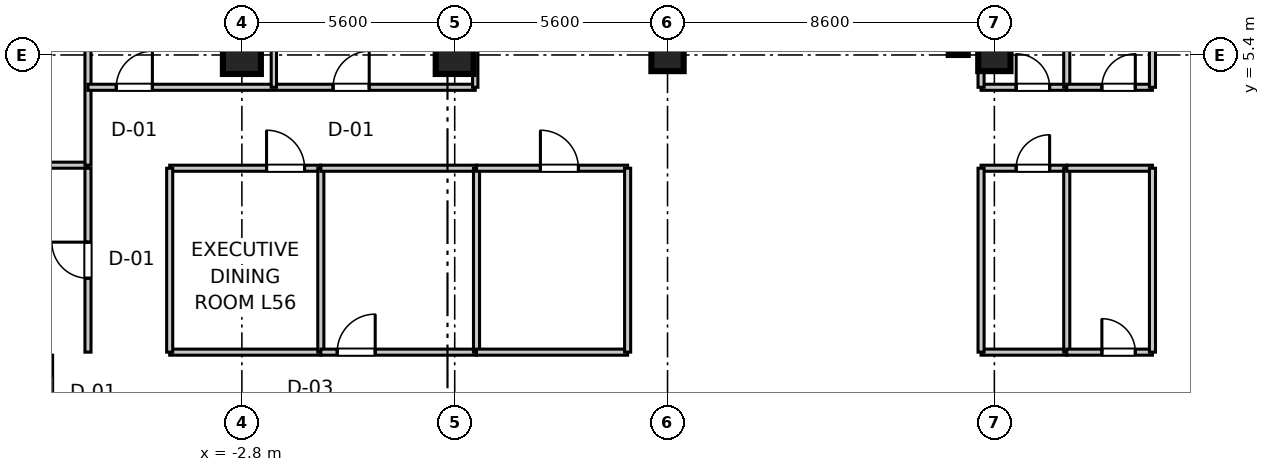
"""IFC4 building model, lengths in metres.
Left out: names, types, materials, properties, quantities, classifications, styles, units other than length and angle.
Written with IfcOpenShell. Run it as: python <this file> out.ifc"""

import sys

from ifc_helpers import new_model, si_unit, direction, frame, frame_2d, origin, origin_2d, place, context, subcontext, project, spatial, rectangle, extrude, source, transform, mapped, element, fill, save


model = new_model("IFC4")
c1 = context("Model", 3, precision=1e-05, world=origin(), true_north=direction((0.0, 1.0)))
c2 = subcontext(c1, "Body", "Model", "MODEL_VIEW")
j1 = project(units=[si_unit("LENGTHUNIT", "METRE"), si_unit("PLANEANGLEUNIT", "RADIAN")], contexts=[c1])
p1 = place(None, origin())
s1 = spatial("IfcSite", under=j1, at=p1, CompositionType="ELEMENT")
p2 = place(p1, origin())
s2 = spatial("IfcBuilding", under=s1, at=p2, CompositionType="ELEMENT")
p3 = place(p2, frame((0.0, 0.0, 219.7)))
s3 = spatial("IfcBuildingStorey", under=s2, at=p3, CompositionType="ELEMENT", Elevation=219.7)
m1 = source(origin(), c2, "Body", "SweptSolid", [
    extrude(rectangle(XDim=1.0, YDim=1.0, at=origin_2d()), origin(), (0.0, 0.0, 1.0), 3.655),
])
for number, where, z_axis, x_axis in (
    (1, (-2.8, 5.4, 0.0), (0.0, 0.0, 1.0), (1.0, 0.0, 0.0)),
    (2, (2.8, 5.4, 0.0), (0.0, 0.0, 1.0), (1.0, 0.0, 0.0)),
):
    element("IfcColumn", number, at=place(p3, frame(where, z_axis=z_axis, x_axis=x_axis)), inside=s3, PredefinedType="COLUMN", context=c2, shape_type="MappedRepresentation", body=[
        mapped(m1, transform((0.0, 0.0, 0.0), scale=1.0)),
    ])
m2 = source(origin(), c2, "Body", "SweptSolid", [
    extrude(rectangle(XDim=0.85, YDim=0.85, at=origin_2d()), origin(), (0.0, 0.0, 1.0), 3.655),
])
for number, where, z_axis, x_axis in (
    (3, (8.4, 5.4, 0.0), (0.0, 0.0, 1.0), (1.0, 0.0, 0.0)),
    (4, (17.0, 5.4, 0.0), (0.0, 0.0, 1.0), (1.0, 0.0, 0.0)),
):
    element("IfcColumn", number, at=place(p3, frame(where, z_axis=z_axis, x_axis=x_axis)), inside=s3, PredefinedType="PILASTER", context=c2, shape_type="MappedRepresentation", body=[
        mapped(m2, transform((0.0, 0.0, 0.0), scale=1.0)),
    ])
m3 = source(origin(), c2, "Body", "SweptSolid", [
    extrude(rectangle(XDim=11.6, YDim=0.5, at=frame_2d((5.8, 0.0))), origin(), (0.0, 0.0, 1.0), 3.41),
])
p4 = place(p3, frame((16.05, 5.4, 0.0), z_axis=(0.0, 0.0, 1.0), x_axis=(0.0, 1.0, 0.0)))
e5 = element("IfcWall", 5, at=p4, inside=s3, PredefinedType="SHEAR", context=c2, shape_type="MappedRepresentation", body=[
    mapped(m3, transform((0.0, 0.0, 0.0), scale=1.0)),
])
m4 = source(origin(), c2, "Body", "SweptSolid", [
    extrude(rectangle(XDim=2.255, YDim=0.16, at=frame_2d((1.127, 0.0))), origin(), (0.0, 0.0, 1.0), 2.75),
])
p5 = place(p3, frame((16.65, 4.55, 0.0), z_axis=(0.0, 0.0, 1.0), x_axis=(1.0, 0.0, 0.0)))
e6 = element("IfcWall", 6, at=p5, inside=s3, PredefinedType="PARTITIONING", context=c2, shape_type="MappedRepresentation", body=[
    mapped(m4, transform((0.0, 0.0, 0.0), scale=1.0)),
])
p6 = place(p5, frame((0.924, 0.0, 0.0)))
e7 = element("IfcOpeningElement", 7, at=p6, cuts=e6, PredefinedType="OPENING", context=c2, shape_type="SweptSolid", body=[
    extrude(rectangle(XDim=0.88, YDim=2.1, at=frame_2d((0.44, 1.05))), frame((0.0, 0.09, 0.0), z_axis=(0.0, -1.0, 0.0), x_axis=(1.0, 0.0, 0.0)), (0.0, 0.0, 1.0), 0.18),
])
m5 = source(origin(), c2, "Body", "SweptSolid", [
    extrude(rectangle(XDim=19.35, YDim=0.16, at=frame_2d((9.675, 0.0))), origin(), (0.0, 0.0, 1.0), 2.75),
])
for number, where, z_axis, x_axis in (
    (8, (16.65, 4.55, 0.0), (0.0, 0.0, 1.0), (0.0, 1.0, 0.0)),
    (9, (18.905, 4.55, 0.0), (0.0, 0.0, 1.0), (0.0, 1.0, 0.0)),
):
    element("IfcWall", number, at=place(p3, frame(where, z_axis=z_axis, x_axis=x_axis)), inside=s3, PredefinedType="PARTITIONING", context=c2, shape_type="MappedRepresentation", body=[
        mapped(m5, transform((0.0, 0.0, 0.0), scale=1.0)),
    ])
m6 = source(origin(), c2, "Body", "SweptSolid", [
    extrude(rectangle(XDim=2.255, YDim=0.16, at=frame_2d((1.127, 0.0))), origin(), (0.0, 0.0, 1.0), 2.75),
])
p7 = place(p3, frame((18.905, 4.55, 0.0), z_axis=(0.0, 0.0, 1.0), x_axis=(1.0, 0.0, 0.0)))
e10 = element("IfcWall", 10, at=p7, inside=s3, PredefinedType="PARTITIONING", context=c2, shape_type="MappedRepresentation", body=[
    mapped(m6, transform((0.0, 0.0, 0.0), scale=1.0)),
])
p8 = place(p7, frame((0.924, 0.0, 0.0)))
e11 = element("IfcOpeningElement", 11, at=p8, cuts=e10, PredefinedType="OPENING", context=c2, shape_type="SweptSolid", body=[
    extrude(rectangle(XDim=0.88, YDim=2.1, at=frame_2d((0.44, 1.05))), frame((0.0, 0.09, 0.0), z_axis=(0.0, -1.0, 0.0), x_axis=(1.0, 0.0, 0.0)), (0.0, 0.0, 1.0), 0.18),
])
m7 = source(origin(), c2, "Body", "SweptSolid", [
    extrude(rectangle(XDim=17.93, YDim=0.16, at=frame_2d((8.965, 0.0))), origin(), (0.0, 0.0, 1.0), 2.75),
])
p9 = place(p3, frame((21.16, 4.55, 0.0), z_axis=(0.0, 0.0, 1.0), x_axis=(0.0, 1.0, 0.0)))
e12 = element("IfcWall", 12, at=p9, inside=s3, PredefinedType="PARTITIONING", context=c2, shape_type="MappedRepresentation", body=[
    mapped(m7, transform((0.0, 0.0, 0.0), scale=1.0)),
])
m8 = source(origin(), c2, "Body", "SweptSolid", [
    extrude(rectangle(XDim=14.31, YDim=0.16, at=frame_2d((7.155, 0.0))), origin(), (0.0, 0.0, 1.0), 2.75),
])
p10 = place(p3, frame((-21.16, 2.5, 0.0), z_axis=(0.0, 0.0, 1.0), x_axis=(1.0, 0.0, 0.0)))
e13 = element("IfcWall", 13, at=p10, inside=s3, PredefinedType="PARTITIONING", context=c2, shape_type="MappedRepresentation", body=[
    mapped(m8, transform((0.0, 0.0, 0.0), scale=1.0)),
])
m9 = source(origin(), c2, "Body", "SweptSolid", [
    extrude(rectangle(XDim=10.7, YDim=0.16, at=frame_2d((5.35, 0.0))), origin(), (0.0, 0.0, 1.0), 2.75),
])
p11 = place(p3, frame((-6.85, 2.5, 0.0), z_axis=(0.0, 0.0, 1.0), x_axis=(0.0, 1.0, 0.0)))
e14 = element("IfcWall", 14, at=p11, inside=s3, PredefinedType="PARTITIONING", context=c2, shape_type="MappedRepresentation", body=[
    mapped(m9, transform((0.0, 0.0, 0.0), scale=1.0)),
])
p12 = place(p11, frame((4.91, 0.0, 0.0)))
e15 = element("IfcOpeningElement", 15, at=p12, cuts=e14, PredefinedType="OPENING", context=c2, shape_type="SweptSolid", body=[
    extrude(rectangle(XDim=0.88, YDim=2.1, at=frame_2d((0.44, 1.05))), frame((0.0, 0.09, 0.0), z_axis=(0.0, -1.0, 0.0), x_axis=(1.0, 0.0, 0.0)), (0.0, 0.0, 1.0), 0.18),
])
m10 = source(origin(), c2, "Body", "SweptSolid", [
    extrude(rectangle(XDim=10.19, YDim=0.16, at=frame_2d((5.095, 0.0))), origin(), (0.0, 0.0, 1.0), 2.75),
])
p13 = place(p3, frame((-6.85, 4.55, 0.0), z_axis=(0.0, 0.0, 1.0), x_axis=(1.0, 0.0, 0.0)))
e16 = element("IfcWall", 16, at=p13, inside=s3, PredefinedType="PARTITIONING", context=c2, shape_type="MappedRepresentation", body=[
    mapped(m10, transform((0.0, 0.0, 0.0), scale=1.0)),
])
p14 = place(p13, frame((0.745, 0.0, 0.0)))
e17 = element("IfcOpeningElement", 17, at=p14, cuts=e16, PredefinedType="OPENING", context=c2, shape_type="SweptSolid", body=[
    extrude(rectangle(XDim=0.95, YDim=2.1, at=frame_2d((0.475, 1.05))), frame((0.0, 0.09, 0.0), z_axis=(0.0, -1.0, 0.0), x_axis=(1.0, 0.0, 0.0)), (0.0, 0.0, 1.0), 0.18),
])
p15 = place(p13, frame((6.45, 0.0, 0.0)))
e18 = element("IfcOpeningElement", 18, at=p15, cuts=e16, PredefinedType="OPENING", context=c2, shape_type="SweptSolid", body=[
    extrude(rectangle(XDim=0.95, YDim=2.1, at=frame_2d((0.475, 1.05))), frame((0.0, 0.09, 0.0), z_axis=(0.0, -1.0, 0.0), x_axis=(1.0, 0.0, 0.0)), (0.0, 0.0, 1.0), 0.18),
])
m11 = source(origin(), c2, "Body", "SweptSolid", [
    extrude(rectangle(XDim=19.35, YDim=0.14, at=frame_2d((9.675, 0.0))), origin(), (0.0, 0.0, 1.0), 2.75),
])
for number, where, z_axis, x_axis in (
    (19, (3.34, 4.55, 0.0), (0.0, 0.0, 1.0), (0.0, 1.0, 0.0)),
    (20, (-1.959, 4.55, 0.0), (0.0, 0.0, 1.0), (0.0, 1.0, 0.0)),
):
    element("IfcWall", number, at=place(p3, frame(where, z_axis=z_axis, x_axis=x_axis)), inside=s3, PredefinedType="PARTITIONING", context=c2, shape_type="MappedRepresentation", body=[
        mapped(m11, transform((0.0, 0.0, 0.0), scale=1.0)),
    ])
m12 = source(origin(), c2, "Body", "SweptSolid", [
    extrude(rectangle(XDim=21.4, YDim=0.16, at=frame_2d((10.7, 0.0))), origin(), (0.0, 0.0, 1.0), 2.75),
])
p16 = place(p3, frame((-7.86, -23.9, 0.0), z_axis=(0.0, 0.0, 1.0), x_axis=(0.0, 1.0, 0.0)))
e21 = element("IfcWall", 21, at=p16, inside=s3, PredefinedType="PARTITIONING", context=c2, shape_type="MappedRepresentation", body=[
    mapped(m12, transform((0.0, 0.0, 0.0), scale=1.0)),
])
p17 = place(p16, frame((19.925, 0.0, 0.0)))
e22 = element("IfcOpeningElement", 22, at=p17, cuts=e21, PredefinedType="OPENING", context=c2, shape_type="SweptSolid", body=[
    extrude(rectangle(XDim=0.95, YDim=2.1, at=frame_2d((0.475, 1.05))), frame((0.0, 0.09, 0.0), z_axis=(0.0, -1.0, 0.0), x_axis=(1.0, 0.0, 0.0)), (0.0, 0.0, 1.0), 0.18),
])
m13 = source(origin(), c2, "Body", "SweptSolid", [
    extrude(rectangle(XDim=4.84, YDim=0.16, at=frame_2d((2.42, 0.0))), origin(), (0.0, 0.0, 1.0), 2.75),
])
p18 = place(p3, frame((-6.85, -2.42, 0.0), z_axis=(0.0, 0.0, 1.0), x_axis=(0.0, 1.0, 0.0)))
e23 = element("IfcWall", 23, at=p18, inside=s3, PredefinedType="PARTITIONING", context=c2, shape_type="MappedRepresentation", body=[
    mapped(m13, transform((0.0, 0.0, 0.0), scale=1.0)),
])
p19 = place(p18, frame((1.945, 0.0, 0.0)))
e24 = element("IfcOpeningElement", 24, at=p19, cuts=e23, PredefinedType="OPENING", context=c2, shape_type="SweptSolid", body=[
    extrude(rectangle(XDim=0.95, YDim=2.1, at=frame_2d((0.475, 1.05))), frame((0.0, 0.09, 0.0), z_axis=(0.0, -1.0, 0.0), x_axis=(1.0, 0.0, 0.0)), (0.0, 0.0, 1.0), 0.18),
])
m14 = source(origin(), c2, "Body", "SweptSolid", [
    extrude(rectangle(XDim=3.977, YDim=0.16, at=frame_2d((1.989, 0.0))), origin(), (0.0, 0.0, 1.0), 2.75),
])
p20 = place(p3, frame((-4.7, -2.42, 0.0), z_axis=(0.0, 0.0, 1.0), x_axis=(1.0, 0.0, 0.0)))
e25 = element("IfcWall", 25, at=p20, inside=s3, PredefinedType="PARTITIONING", context=c2, shape_type="MappedRepresentation", body=[
    mapped(m14, transform((0.0, 0.0, 0.0), scale=1.0)),
])
p21 = place(p3, frame((-4.7, 2.42, 0.0), z_axis=(0.0, 0.0, 1.0), x_axis=(1.0, 0.0, 0.0)))
e26 = element("IfcWall", 26, at=p21, inside=s3, PredefinedType="PARTITIONING", context=c2, shape_type="MappedRepresentation", body=[
    mapped(m14, transform((0.0, 0.0, 0.0), scale=1.0)),
])
p22 = place(p21, frame((2.549, 0.0, 0.0)))
e27 = element("IfcOpeningElement", 27, at=p22, cuts=e26, PredefinedType="OPENING", context=c2, shape_type="SweptSolid", body=[
    extrude(rectangle(XDim=1.0, YDim=2.1, at=frame_2d((0.5, 1.05))), frame((0.0, 0.09, 0.0), z_axis=(0.0, -1.0, 0.0), x_axis=(1.0, 0.0, 0.0)), (0.0, 0.0, 1.0), 0.18),
])
for number, where, z_axis, x_axis in (
    (28, (-4.7, -2.42, 0.0), (0.0, 0.0, 1.0), (0.0, 1.0, 0.0)),
    (29, (-0.723, -2.42, 0.0), (0.0, 0.0, 1.0), (0.0, 1.0, 0.0)),
):
    element("IfcWall", number, at=place(p3, frame(where, z_axis=z_axis, x_axis=x_axis)), inside=s3, PredefinedType="PARTITIONING", context=c2, shape_type="MappedRepresentation", body=[
        mapped(m13, transform((0.0, 0.0, 0.0), scale=1.0)),
    ])
m15 = source(origin(), c2, "Body", "SweptSolid", [
    extrude(rectangle(XDim=4.097, YDim=0.16, at=frame_2d((2.048, 0.0))), origin(), (0.0, 0.0, 1.0), 2.75),
])
p23 = place(p3, frame((-0.723, -2.42, 0.0), z_axis=(0.0, 0.0, 1.0), x_axis=(1.0, 0.0, 0.0)))
e30 = element("IfcWall", 30, at=p23, inside=s3, PredefinedType="PARTITIONING", context=c2, shape_type="MappedRepresentation", body=[
    mapped(m15, transform((0.0, 0.0, 0.0), scale=1.0)),
])
p24 = place(p23, frame((0.431, 0.0, 0.0)))
e31 = element("IfcOpeningElement", 31, at=p24, cuts=e30, PredefinedType="OPENING", context=c2, shape_type="SweptSolid", body=[
    extrude(rectangle(XDim=1.0, YDim=2.1, at=frame_2d((0.5, 1.05))), frame((0.0, 0.09, 0.0), z_axis=(0.0, -1.0, 0.0), x_axis=(1.0, 0.0, 0.0)), (0.0, 0.0, 1.0), 0.18),
])
p25 = place(p3, frame((-0.723, 2.42, 0.0), z_axis=(0.0, 0.0, 1.0), x_axis=(1.0, 0.0, 0.0)))
e32 = element("IfcWall", 32, at=p25, inside=s3, PredefinedType="PARTITIONING", context=c2, shape_type="MappedRepresentation", body=[
    mapped(m15, transform((0.0, 0.0, 0.0), scale=1.0)),
])
p26 = place(p3, frame((3.374, -2.42, 0.0), z_axis=(0.0, 0.0, 1.0), x_axis=(0.0, 1.0, 0.0)))
e33 = element("IfcWall", 33, at=p26, inside=s3, PredefinedType="PARTITIONING", context=c2, shape_type="MappedRepresentation", body=[
    mapped(m13, transform((0.0, 0.0, 0.0), scale=1.0)),
])
m16 = source(origin(), c2, "Body", "SweptSolid", [
    extrude(rectangle(XDim=3.976, YDim=0.16, at=frame_2d((1.988, 0.0))), origin(), (0.0, 0.0, 1.0), 2.75),
])
p27 = place(p3, frame((3.374, -2.42, 0.0), z_axis=(0.0, 0.0, 1.0), x_axis=(1.0, 0.0, 0.0)))
e34 = element("IfcWall", 34, at=p27, inside=s3, PredefinedType="PARTITIONING", context=c2, shape_type="MappedRepresentation", body=[
    mapped(m16, transform((0.0, 0.0, 0.0), scale=1.0)),
])
p28 = place(p3, frame((3.374, 2.42, 0.0), z_axis=(0.0, 0.0, 1.0), x_axis=(1.0, 0.0, 0.0)))
e35 = element("IfcWall", 35, at=p28, inside=s3, PredefinedType="PARTITIONING", context=c2, shape_type="MappedRepresentation", body=[
    mapped(m16, transform((0.0, 0.0, 0.0), scale=1.0)),
])
p29 = place(p28, frame((1.681, 0.0, 0.0)))
e36 = element("IfcOpeningElement", 36, at=p29, cuts=e35, PredefinedType="OPENING", context=c2, shape_type="SweptSolid", body=[
    extrude(rectangle(XDim=1.0, YDim=2.1, at=frame_2d((0.5, 1.05))), frame((0.0, 0.09, 0.0), z_axis=(0.0, -1.0, 0.0), x_axis=(1.0, 0.0, 0.0)), (0.0, 0.0, 1.0), 0.18),
])
p30 = place(p3, frame((7.35, -2.42, 0.0), z_axis=(0.0, 0.0, 1.0), x_axis=(0.0, 1.0, 0.0)))
e37 = element("IfcWall", 37, at=p30, inside=s3, PredefinedType="PARTITIONING", context=c2, shape_type="MappedRepresentation", body=[
    mapped(m13, transform((0.0, 0.0, 0.0), scale=1.0)),
])
p31 = place(p3, frame((16.65, -2.42, 0.0), z_axis=(0.0, 0.0, 1.0), x_axis=(1.0, 0.0, 0.0)))
e38 = element("IfcWall", 38, at=p31, inside=s3, PredefinedType="PARTITIONING", context=c2, shape_type="MappedRepresentation", body=[
    mapped(m4, transform((0.0, 0.0, 0.0), scale=1.0)),
])
p32 = place(p3, frame((16.65, 2.42, 0.0), z_axis=(0.0, 0.0, 1.0), x_axis=(1.0, 0.0, 0.0)))
e39 = element("IfcWall", 39, at=p32, inside=s3, PredefinedType="PARTITIONING", context=c2, shape_type="MappedRepresentation", body=[
    mapped(m4, transform((0.0, 0.0, 0.0), scale=1.0)),
])
p33 = place(p32, frame((0.924, 0.0, 0.0)))
e40 = element("IfcOpeningElement", 40, at=p33, cuts=e39, PredefinedType="OPENING", context=c2, shape_type="SweptSolid", body=[
    extrude(rectangle(XDim=0.88, YDim=2.1, at=frame_2d((0.44, 1.05))), frame((0.0, 0.09, 0.0), z_axis=(0.0, -1.0, 0.0), x_axis=(1.0, 0.0, 0.0)), (0.0, 0.0, 1.0), 0.18),
])
for number, where, z_axis, x_axis in (
    (41, (16.65, -2.42, 0.0), (0.0, 0.0, 1.0), (0.0, 1.0, 0.0)),
    (42, (18.905, -2.42, 0.0), (0.0, 0.0, 1.0), (0.0, 1.0, 0.0)),
):
    element("IfcWall", number, at=place(p3, frame(where, z_axis=z_axis, x_axis=x_axis)), inside=s3, PredefinedType="PARTITIONING", context=c2, shape_type="MappedRepresentation", body=[
        mapped(m13, transform((0.0, 0.0, 0.0), scale=1.0)),
    ])
p34 = place(p3, frame((18.905, -2.42, 0.0), z_axis=(0.0, 0.0, 1.0), x_axis=(1.0, 0.0, 0.0)))
e43 = element("IfcWall", 43, at=p34, inside=s3, PredefinedType="PARTITIONING", context=c2, shape_type="MappedRepresentation", body=[
    mapped(m6, transform((0.0, 0.0, 0.0), scale=1.0)),
])
p35 = place(p34, frame((0.924, 0.0, 0.0)))
e44 = element("IfcOpeningElement", 44, at=p35, cuts=e43, PredefinedType="OPENING", context=c2, shape_type="SweptSolid", body=[
    extrude(rectangle(XDim=0.88, YDim=2.1, at=frame_2d((0.44, 1.05))), frame((0.0, 0.09, 0.0), z_axis=(0.0, -1.0, 0.0), x_axis=(1.0, 0.0, 0.0)), (0.0, 0.0, 1.0), 0.18),
])
p36 = place(p3, frame((18.905, 2.42, 0.0), z_axis=(0.0, 0.0, 1.0), x_axis=(1.0, 0.0, 0.0)))
e45 = element("IfcWall", 45, at=p36, inside=s3, PredefinedType="PARTITIONING", context=c2, shape_type="MappedRepresentation", body=[
    mapped(m6, transform((0.0, 0.0, 0.0), scale=1.0)),
])
p37 = place(p3, frame((21.16, -2.42, 0.0), z_axis=(0.0, 0.0, 1.0), x_axis=(0.0, 1.0, 0.0)))
e46 = element("IfcWall", 46, at=p37, inside=s3, PredefinedType="PARTITIONING", context=c2, shape_type="MappedRepresentation", body=[
    mapped(m13, transform((0.0, 0.0, 0.0), scale=1.0)),
])
m17 = source(origin(), c2, "Body", "SweptSolid", [
    extrude(rectangle(XDim=0.88, YDim=2.1, at=frame_2d((0.44, 1.05))), frame((0.0, 0.025, 0.0), z_axis=(0.0, -1.0, 0.0), x_axis=(1.0, 0.0, 0.0)), (0.0, 0.0, 1.0), 0.05),
])
p38 = place(p6, origin())
e47 = element("IfcDoor", 47, at=p38, inside=s3, OperationType="SINGLE_SWING_LEFT", PredefinedType="DOOR", context=c2, shape_type="MappedRepresentation", body=[
    mapped(m17, transform((0.0, 0.0, 0.0), scale=1.0)),
])
fill(e7, e47)
p39 = place(p8, origin())
e48 = element("IfcDoor", 48, at=p39, inside=s3, OperationType="SINGLE_SWING_RIGHT", PredefinedType="DOOR", context=c2, shape_type="MappedRepresentation", body=[
    mapped(m17, transform((0.0, 0.0, 0.0), scale=1.0)),
])
fill(e11, e48)
m18 = source(origin(), c2, "Body", "SweptSolid", [
    extrude(rectangle(XDim=0.95, YDim=2.1, at=frame_2d((0.475, 1.05))), frame((0.0, 0.025, 0.0), z_axis=(0.0, -1.0, 0.0), x_axis=(1.0, 0.0, 0.0)), (0.0, 0.0, 1.0), 0.05),
])
p40 = place(p14, origin())
e49 = element("IfcDoor", 49, at=p40, inside=s3, OperationType="SINGLE_SWING_RIGHT", PredefinedType="DOOR", context=c2, shape_type="MappedRepresentation", body=[
    mapped(m18, transform((0.0, 0.0, 0.0), scale=1.0)),
])
fill(e17, e49)
p41 = place(p15, origin())
e50 = element("IfcDoor", 50, at=p41, inside=s3, OperationType="SINGLE_SWING_RIGHT", PredefinedType="DOOR", context=c2, shape_type="MappedRepresentation", body=[
    mapped(m18, transform((0.0, 0.0, 0.0), scale=1.0)),
])
fill(e18, e50)
p42 = place(p19, origin())
e51 = element("IfcDoor", 51, at=p42, inside=s3, OperationType="SINGLE_SWING_RIGHT", PredefinedType="DOOR", context=c2, shape_type="MappedRepresentation", body=[
    mapped(m18, transform((0.0, 0.0, 0.0), scale=1.0)),
])
fill(e24, e51)
m19 = source(origin(), c2, "Body", "SweptSolid", [
    extrude(rectangle(XDim=1.0, YDim=2.1, at=frame_2d((0.5, 1.05))), frame((0.0, 0.025, 0.0), z_axis=(0.0, -1.0, 0.0), x_axis=(1.0, 0.0, 0.0)), (0.0, 0.0, 1.0), 0.05),
])
p43 = place(p22, frame((1.0, 0.0, 0.0), z_axis=(0.0, 0.0, 1.0), x_axis=(-1.0, 0.0, 0.0)))
e52 = element("IfcDoor", 52, at=p43, inside=s3, OperationType="SINGLE_SWING_LEFT", PredefinedType="DOOR", context=c2, shape_type="MappedRepresentation", body=[
    mapped(m19, transform((0.0, 0.0, 0.0), scale=1.0)),
])
fill(e27, e52)
p44 = place(p24, origin())
e53 = element("IfcDoor", 53, at=p44, inside=s3, OperationType="SINGLE_SWING_RIGHT", PredefinedType="DOOR", context=c2, shape_type="MappedRepresentation", body=[
    mapped(m19, transform((0.0, 0.0, 0.0), scale=1.0)),
])
fill(e31, e53)
p45 = place(p29, frame((1.0, 0.0, 0.0), z_axis=(0.0, 0.0, 1.0), x_axis=(-1.0, 0.0, 0.0)))
e54 = element("IfcDoor", 54, at=p45, inside=s3, OperationType="SINGLE_SWING_LEFT", PredefinedType="DOOR", context=c2, shape_type="MappedRepresentation", body=[
    mapped(m19, transform((0.0, 0.0, 0.0), scale=1.0)),
])
fill(e36, e54)
p46 = place(p33, frame((0.88, 0.0, 0.0), z_axis=(0.0, 0.0, 1.0), x_axis=(-1.0, 0.0, 0.0)))
e55 = element("IfcDoor", 55, at=p46, inside=s3, OperationType="SINGLE_SWING_RIGHT", PredefinedType="DOOR", context=c2, shape_type="MappedRepresentation", body=[
    mapped(m17, transform((0.0, 0.0, 0.0), scale=1.0)),
])
fill(e40, e55)
p47 = place(p35, origin())
e56 = element("IfcDoor", 56, at=p47, inside=s3, OperationType="SINGLE_SWING_LEFT", PredefinedType="DOOR", context=c2, shape_type="MappedRepresentation", body=[
    mapped(m17, transform((0.0, 0.0, 0.0), scale=1.0)),
])
fill(e44, e56)
save(model, sys.argv[1])
